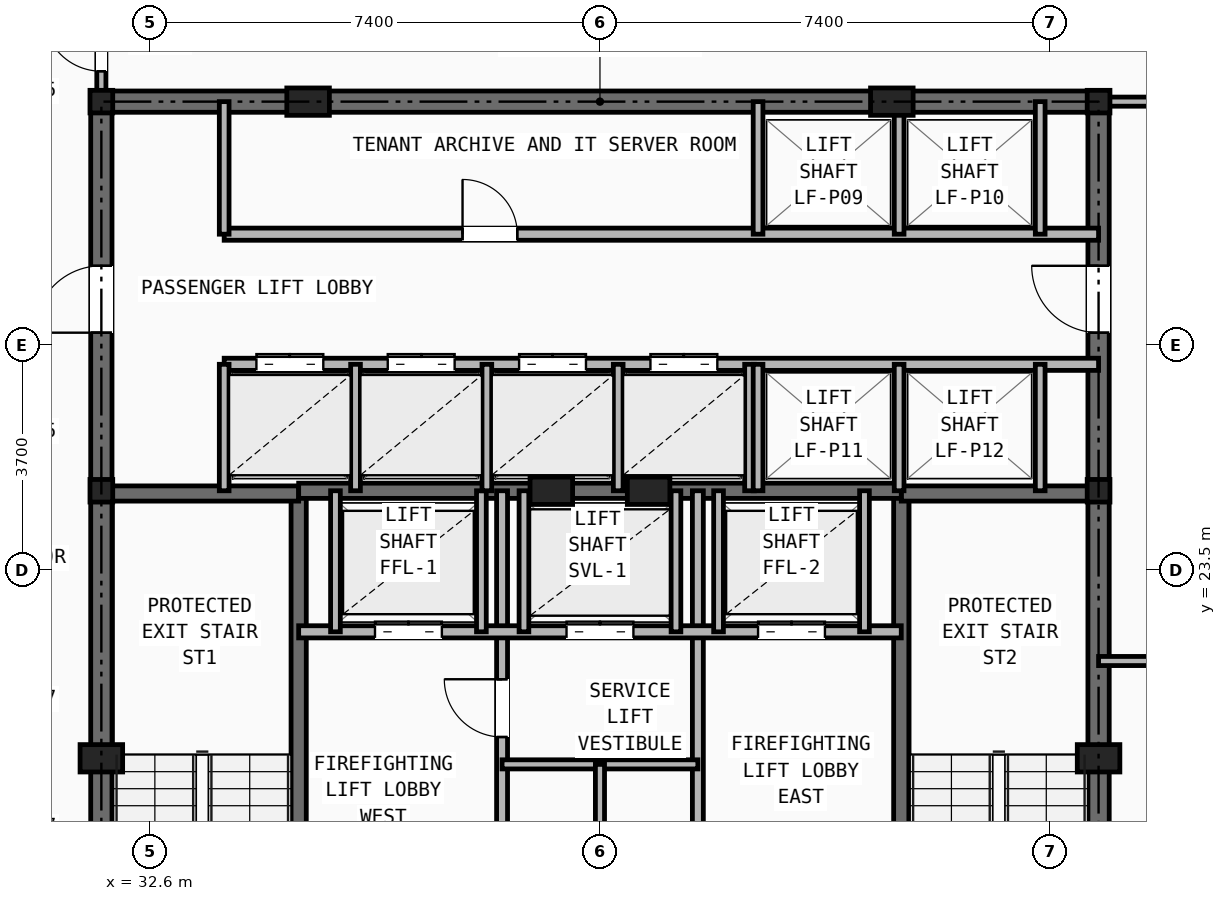
"""IFC4 building model, lengths in metres.
Left out: names, types, materials, properties, quantities, classifications, styles, units other than length and angle.
Written with IfcOpenShell. Run it as: python <this file> out.ifc"""

import sys

from ifc_helpers import new_model, si_unit, direction, frame, frame_2d, origin, origin_2d, place, context, subcontext, project, spatial, rectangle, i_section, extrude, element, fill, save


model = new_model("IFC4")
c1 = context("Model", 3, precision=1e-05, world=origin(), true_north=direction((0.0, 1.0)))
c2 = subcontext(c1, "Body", "Model", "MODEL_VIEW")
j1 = project(units=[si_unit("LENGTHUNIT", "METRE"), si_unit("PLANEANGLEUNIT", "RADIAN")], contexts=[c1])
p1 = place(None, origin())
s1 = spatial("IfcSite", under=j1, at=p1, CompositionType="ELEMENT")
p2 = place(p1, origin())
s2 = spatial("IfcBuilding", under=s1, at=p2, CompositionType="ELEMENT")
p3 = place(p2, frame((0.0, 0.0, 122.9)))
s3 = spatial("IfcBuildingStorey", under=s2, at=p3, CompositionType="ELEMENT", Elevation=122.9)
for number, where, z_axis, x_axis in (
    (1, (31.8, 24.8, 0.0), (0.0, 0.0, 1.0), (1.0, 0.0, 0.0)),
    (2, (48.2, 24.8, 0.0), (0.0, 0.0, 1.0), (1.0, 0.0, 0.0)),
    (3, (31.8, 31.2, 0.0), (0.0, 0.0, 1.0), (1.0, 0.0, 0.0)),
    (4, (48.2, 31.2, 0.0), (0.0, 0.0, 1.0), (1.0, 0.0, 0.0)),
):
    element("IfcColumn", number, at=place(p3, frame(where, z_axis=z_axis, x_axis=x_axis)), inside=s3, PredefinedType="COLUMN", context=c2, shape_type="SweptSolid", body=[
        extrude(i_section(OverallWidth=0.374, OverallDepth=0.372, WebThickness=0.016, FlangeThickness=0.026, at=origin_2d()), origin(), (0.0, 0.0, 1.0), 3.45),
    ])
for number, where, z_axis, x_axis in (
    (5, (31.8, 20.4, 0.0), (0.0, 0.0, 1.0), (1.0, 0.0, 0.0)),
    (6, (48.2, 20.4, 0.0), (0.0, 0.0, 1.0), (1.0, 0.0, 0.0)),
    (7, (35.2, 31.2, 0.0), (0.0, 0.0, 1.0), (1.0, 0.0, 0.0)),
    (8, (44.8, 31.2, 0.0), (0.0, 0.0, 1.0), (1.0, 0.0, 0.0)),
    (9, (39.2, 24.8, 0.0), (0.0, 0.0, 1.0), (1.0, 0.0, 0.0)),
    (10, (40.8, 24.8, 0.0), (0.0, 0.0, 1.0), (1.0, 0.0, 0.0)),
):
    element("IfcColumn", number, at=place(p3, frame(where, z_axis=z_axis, x_axis=x_axis)), inside=s3, PredefinedType="PILASTER", context=c2, shape_type="SweptSolid", body=[
        extrude(rectangle(XDim=0.7, YDim=0.45, at=origin_2d()), origin(), (0.0, 0.0, 1.0), 3.45),
    ])
p4 = place(p3, frame((31.8, 31.2, 0.0), z_axis=(0.0, 0.0, 1.0), x_axis=(1.0, 0.0, 0.0)))
e11 = element("IfcWall", 11, at=p4, inside=s3, PredefinedType="SHEAR", context=c2, shape_type="SweptSolid", body=[
    extrude(rectangle(XDim=16.4, YDim=0.35, at=frame_2d((8.2, 0.0))), origin(), (0.0, 0.0, 1.0), 3.21),
])
p5 = place(p3, frame((31.8, 16.4, 0.0), z_axis=(0.0, 0.0, 1.0), x_axis=(0.0, 1.0, 0.0)))
e12 = element("IfcWall", 12, at=p5, inside=s3, PredefinedType="SHEAR", context=c2, shape_type="SweptSolid", body=[
    extrude(rectangle(XDim=14.8, YDim=0.35, at=frame_2d((7.4, 0.0))), origin(), (0.0, 0.0, 1.0), 3.21),
])
p6 = place(p5, frame((11.0, 0.0, 0.0)))
e13 = element("IfcOpeningElement", 13, at=p6, cuts=e12, PredefinedType="OPENING", context=c2, shape_type="SweptSolid", body=[
    extrude(rectangle(XDim=1.1, YDim=2.15, at=frame_2d((0.55, 1.075))), frame((0.0, 0.185, 0.0), z_axis=(0.0, -1.0, 0.0), x_axis=(1.0, 0.0, 0.0)), (0.0, 0.0, 1.0), 0.37),
])
p7 = place(p3, frame((48.2, 16.4, 0.0), z_axis=(0.0, 0.0, 1.0), x_axis=(0.0, 1.0, 0.0)))
e14 = element("IfcWall", 14, at=p7, inside=s3, PredefinedType="SHEAR", context=c2, shape_type="SweptSolid", body=[
    extrude(rectangle(XDim=14.8, YDim=0.35, at=frame_2d((7.4, 0.0))), origin(), (0.0, 0.0, 1.0), 3.21),
])
p8 = place(p7, frame((11.0, 0.0, 0.0)))
e15 = element("IfcOpeningElement", 15, at=p8, cuts=e14, PredefinedType="OPENING", context=c2, shape_type="SweptSolid", body=[
    extrude(rectangle(XDim=1.1, YDim=2.15, at=frame_2d((0.55, 1.075))), frame((0.0, 0.185, 0.0), z_axis=(0.0, -1.0, 0.0), x_axis=(1.0, 0.0, 0.0)), (0.0, 0.0, 1.0), 0.37),
])
p9 = place(p3, frame((35.045, 16.4, 0.0), z_axis=(0.0, 0.0, 1.0), x_axis=(0.0, 1.0, 0.0)))
e16 = element("IfcWall", 16, at=p9, inside=s3, PredefinedType="SHEAR", context=c2, shape_type="SweptSolid", body=[
    extrude(rectangle(XDim=8.4, YDim=0.25, at=frame_2d((4.2, 0.0))), origin(), (0.0, 0.0, 1.0), 3.21),
])
p10 = place(p9, frame((0.45, 0.0, 0.0)))
e17 = element("IfcOpeningElement", 17, at=p10, cuts=e16, PredefinedType="OPENING", context=c2, shape_type="SweptSolid", body=[
    extrude(rectangle(XDim=0.95, YDim=2.1, at=frame_2d((0.475, 1.05))), frame((0.0, 0.135, 0.0), z_axis=(0.0, -1.0, 0.0), x_axis=(1.0, 0.0, 0.0)), (0.0, 0.0, 1.0), 0.27),
])
p11 = place(p3, frame((31.8, 24.755, 0.0), z_axis=(0.0, 0.0, 1.0), x_axis=(1.0, 0.0, 0.0)))
e18 = element("IfcWall", 18, at=p11, inside=s3, PredefinedType="SHEAR", context=c2, shape_type="SweptSolid", body=[
    extrude(rectangle(XDim=3.245, YDim=0.25, at=frame_2d((1.623, 0.0))), origin(), (0.0, 0.0, 1.0), 3.21),
])
p12 = place(p3, frame((44.955, 16.4, 0.0), z_axis=(0.0, 0.0, 1.0), x_axis=(0.0, 1.0, 0.0)))
e19 = element("IfcWall", 19, at=p12, inside=s3, PredefinedType="SHEAR", context=c2, shape_type="SweptSolid", body=[
    extrude(rectangle(XDim=8.4, YDim=0.25, at=frame_2d((4.2, 0.0))), origin(), (0.0, 0.0, 1.0), 3.21),
])
p13 = place(p12, frame((0.45, 0.0, 0.0)))
e20 = element("IfcOpeningElement", 20, at=p13, cuts=e19, PredefinedType="OPENING", context=c2, shape_type="SweptSolid", body=[
    extrude(rectangle(XDim=0.95, YDim=2.1, at=frame_2d((0.475, 1.05))), frame((0.0, 0.135, 0.0), z_axis=(0.0, -1.0, 0.0), x_axis=(1.0, 0.0, 0.0)), (0.0, 0.0, 1.0), 0.27),
])
p14 = place(p3, frame((44.955, 24.755, 0.0), z_axis=(0.0, 0.0, 1.0), x_axis=(1.0, 0.0, 0.0)))
e21 = element("IfcWall", 21, at=p14, inside=s3, PredefinedType="SHEAR", context=c2, shape_type="SweptSolid", body=[
    extrude(rectangle(XDim=3.245, YDim=0.25, at=frame_2d((1.623, 0.0))), origin(), (0.0, 0.0, 1.0), 3.21),
])
p15 = place(p3, frame((35.045, 24.8, 0.0), z_axis=(0.0, 0.0, 1.0), x_axis=(1.0, 0.0, 0.0)))
e22 = element("IfcWall", 22, at=p15, inside=s3, PredefinedType="SHEAR", context=c2, shape_type="SweptSolid", body=[
    extrude(rectangle(XDim=9.91, YDim=0.25, at=frame_2d((4.955, 0.0))), origin(), (0.0, 0.0, 1.0), 3.21),
])
p16 = place(p3, frame((38.39, 16.4, 0.0), z_axis=(0.0, 0.0, 1.0), x_axis=(0.0, 1.0, 0.0)))
e23 = element("IfcWall", 23, at=p16, inside=s3, PredefinedType="PARTITIONING", context=c2, shape_type="SweptSolid", body=[
    extrude(rectangle(XDim=8.4, YDim=0.18, at=frame_2d((4.2, 0.0))), origin(), (0.0, 0.0, 1.0), 2.938),
])
p17 = place(p16, frame((1.8, 0.0, 0.0)))
e24 = element("IfcOpeningElement", 24, at=p17, cuts=e23, PredefinedType="OPENING", context=c2, shape_type="SweptSolid", body=[
    extrude(rectangle(XDim=0.85, YDim=2.05, at=frame_2d((0.425, 1.025))), frame((0.0, 0.1, 0.0), z_axis=(0.0, -1.0, 0.0), x_axis=(1.0, 0.0, 0.0)), (0.0, 0.0, 1.0), 0.2),
])
p18 = place(p16, frame((4.35, 0.0, 0.0)))
e25 = element("IfcOpeningElement", 25, at=p18, cuts=e23, PredefinedType="OPENING", context=c2, shape_type="SweptSolid", body=[
    extrude(rectangle(XDim=0.95, YDim=2.1, at=frame_2d((0.475, 1.05))), frame((0.0, 0.1, 0.0), z_axis=(0.0, -1.0, 0.0), x_axis=(1.0, 0.0, 0.0)), (0.0, 0.0, 1.0), 0.2),
])
p19 = place(p3, frame((41.61, 16.4, 0.0), z_axis=(0.0, 0.0, 1.0), x_axis=(0.0, 1.0, 0.0)))
e26 = element("IfcWall", 26, at=p19, inside=s3, PredefinedType="PARTITIONING", context=c2, shape_type="SweptSolid", body=[
    extrude(rectangle(XDim=8.4, YDim=0.18, at=frame_2d((4.2, 0.0))), origin(), (0.0, 0.0, 1.0), 2.938),
])
p20 = place(p19, frame((1.8, 0.0, 0.0)))
e27 = element("IfcOpeningElement", 27, at=p20, cuts=e26, PredefinedType="OPENING", context=c2, shape_type="SweptSolid", body=[
    extrude(rectangle(XDim=0.85, YDim=2.05, at=frame_2d((0.425, 1.025))), frame((0.0, 0.1, 0.0), z_axis=(0.0, -1.0, 0.0), x_axis=(1.0, 0.0, 0.0)), (0.0, 0.0, 1.0), 0.2),
])
p21 = place(p3, frame((35.045, 22.48, 0.0), z_axis=(0.0, 0.0, 1.0), x_axis=(1.0, 0.0, 0.0)))
e28 = element("IfcWall", 28, at=p21, inside=s3, PredefinedType="SOLIDWALL", context=c2, shape_type="SweptSolid", body=[
    extrude(rectangle(XDim=9.91, YDim=0.2, at=frame_2d((4.955, 0.0))), origin(), (0.0, 0.0, 1.0), 3.21),
])
p22 = place(p21, frame((1.255, 0.0, 0.0)))
e29 = element("IfcOpeningElement", 29, at=p22, cuts=e28, PredefinedType="OPENING", context=c2, shape_type="SweptSolid", body=[
    extrude(rectangle(XDim=1.1, YDim=2.15, at=frame_2d((0.55, 1.075))), frame((0.0, 0.11, 0.0), z_axis=(0.0, -1.0, 0.0), x_axis=(1.0, 0.0, 0.0)), (0.0, 0.0, 1.0), 0.22),
])
p23 = place(p21, frame((7.555, 0.0, 0.0)))
e30 = element("IfcOpeningElement", 30, at=p23, cuts=e28, PredefinedType="OPENING", context=c2, shape_type="SweptSolid", body=[
    extrude(rectangle(XDim=1.1, YDim=2.15, at=frame_2d((0.55, 1.075))), frame((0.0, 0.11, 0.0), z_axis=(0.0, -1.0, 0.0), x_axis=(1.0, 0.0, 0.0)), (0.0, 0.0, 1.0), 0.22),
])
p24 = place(p21, frame((4.405, 0.0, 0.0)))
e31 = element("IfcOpeningElement", 31, at=p24, cuts=e28, PredefinedType="OPENING", context=c2, shape_type="SweptSolid", body=[
    extrude(rectangle(XDim=1.1, YDim=2.15, at=frame_2d((0.55, 1.075))), frame((0.0, 0.11, 0.0), z_axis=(0.0, -1.0, 0.0), x_axis=(1.0, 0.0, 0.0)), (0.0, 0.0, 1.0), 0.22),
])
p25 = place(p3, frame((38.39, 20.3, 0.0), z_axis=(0.0, 0.0, 1.0), x_axis=(1.0, 0.0, 0.0)))
e32 = element("IfcWall", 32, at=p25, inside=s3, PredefinedType="PARTITIONING", context=c2, shape_type="SweptSolid", body=[
    extrude(rectangle(XDim=3.22, YDim=0.15, at=frame_2d((1.61, 0.0))), origin(), (0.0, 0.0, 1.0), 3.21),
])
p26 = place(p3, frame((40.0, 16.4, 0.0), z_axis=(0.0, 0.0, 1.0), x_axis=(0.0, 1.0, 0.0)))
e33 = element("IfcWall", 33, at=p26, inside=s3, PredefinedType="PARTITIONING", context=c2, shape_type="SweptSolid", body=[
    extrude(rectangle(XDim=3.9, YDim=0.15, at=frame_2d((1.95, 0.0))), origin(), (0.0, 0.0, 1.0), 2.938),
])
for number, where, z_axis, x_axis in (
    (34, (35.65, 22.48, 0.0), (0.0, 0.0, 1.0), (0.0, 1.0, 0.0)),
    (35, (38.05, 22.48, 0.0), (0.0, 0.0, 1.0), (0.0, 1.0, 0.0)),
    (36, (41.95, 22.48, 0.0), (0.0, 0.0, 1.0), (0.0, 1.0, 0.0)),
    (37, (44.35, 22.48, 0.0), (0.0, 0.0, 1.0), (0.0, 1.0, 0.0)),
    (38, (38.75, 22.48, 0.0), (0.0, 0.0, 1.0), (0.0, 1.0, 0.0)),
    (39, (41.25, 22.48, 0.0), (0.0, 0.0, 1.0), (0.0, 1.0, 0.0)),
):
    element("IfcWall", number, at=place(p3, frame(where, z_axis=z_axis, x_axis=x_axis)), inside=s3, PredefinedType="SOLIDWALL", context=c2, shape_type="SweptSolid", body=[
        extrude(rectangle(XDim=2.32, YDim=0.16, at=frame_2d((1.16, 0.0))), origin(), (0.0, 0.0, 1.0), 3.21),
    ])
p27 = place(p3, frame((33.82, 29.02, 0.0), z_axis=(0.0, 0.0, 1.0), x_axis=(1.0, 0.0, 0.0)))
e40 = element("IfcWall", 40, at=p27, inside=s3, PredefinedType="SOLIDWALL", context=c2, shape_type="SweptSolid", body=[
    extrude(rectangle(XDim=14.38, YDim=0.2, at=frame_2d((7.19, 0.0))), origin(), (0.0, 0.0, 1.0), 2.661),
])
p28 = place(p27, frame((3.92, 0.0, 0.0)))
e41 = element("IfcOpeningElement", 41, at=p28, cuts=e40, PredefinedType="OPENING", context=c2, shape_type="SweptSolid", body=[
    extrude(rectangle(XDim=0.9, YDim=2.1, at=frame_2d((0.45, 1.05))), frame((0.0, 0.11, 0.0), z_axis=(0.0, -1.0, 0.0), x_axis=(1.0, 0.0, 0.0)), (0.0, 0.0, 1.0), 0.22),
])
p29 = place(p3, frame((33.82, 26.88, 0.0), z_axis=(0.0, 0.0, 1.0), x_axis=(1.0, 0.0, 0.0)))
e42 = element("IfcWall", 42, at=p29, inside=s3, PredefinedType="SOLIDWALL", context=c2, shape_type="SweptSolid", body=[
    extrude(rectangle(XDim=14.38, YDim=0.2, at=frame_2d((7.19, 0.0))), origin(), (0.0, 0.0, 1.0), 2.661),
])
p30 = place(p29, frame((0.53, 0.0, 0.0)))
e43 = element("IfcOpeningElement", 43, at=p30, cuts=e42, PredefinedType="OPENING", context=c2, shape_type="SweptSolid", body=[
    extrude(rectangle(XDim=1.1, YDim=2.15, at=frame_2d((0.55, 1.075))), frame((0.0, 0.11, 0.0), z_axis=(0.0, -1.0, 0.0), x_axis=(1.0, 0.0, 0.0)), (0.0, 0.0, 1.0), 0.22),
])
p31 = place(p29, frame((2.69, 0.0, 0.0)))
e44 = element("IfcOpeningElement", 44, at=p31, cuts=e42, PredefinedType="OPENING", context=c2, shape_type="SweptSolid", body=[
    extrude(rectangle(XDim=1.1, YDim=2.15, at=frame_2d((0.55, 1.075))), frame((0.0, 0.11, 0.0), z_axis=(0.0, -1.0, 0.0), x_axis=(1.0, 0.0, 0.0)), (0.0, 0.0, 1.0), 0.22),
])
p32 = place(p29, frame((4.85, 0.0, 0.0)))
e45 = element("IfcOpeningElement", 45, at=p32, cuts=e42, PredefinedType="OPENING", context=c2, shape_type="SweptSolid", body=[
    extrude(rectangle(XDim=1.1, YDim=2.15, at=frame_2d((0.55, 1.075))), frame((0.0, 0.11, 0.0), z_axis=(0.0, -1.0, 0.0), x_axis=(1.0, 0.0, 0.0)), (0.0, 0.0, 1.0), 0.22),
])
p33 = place(p29, frame((7.01, 0.0, 0.0)))
e46 = element("IfcOpeningElement", 46, at=p33, cuts=e42, PredefinedType="OPENING", context=c2, shape_type="SweptSolid", body=[
    extrude(rectangle(XDim=1.1, YDim=2.15, at=frame_2d((0.55, 1.075))), frame((0.0, 0.11, 0.0), z_axis=(0.0, -1.0, 0.0), x_axis=(1.0, 0.0, 0.0)), (0.0, 0.0, 1.0), 0.22),
])
p34 = place(p3, frame((33.82, 29.02, 0.0), z_axis=(0.0, 0.0, 1.0), x_axis=(0.0, 1.0, 0.0)))
e47 = element("IfcWall", 47, at=p34, inside=s3, PredefinedType="SOLIDWALL", context=c2, shape_type="SweptSolid", body=[
    extrude(rectangle(XDim=2.18, YDim=0.16, at=frame_2d((1.09, 0.0))), origin(), (0.0, 0.0, 1.0), 2.938),
])
for number, where, z_axis, x_axis in (
    (48, (33.82, 24.8, 0.0), (0.0, 0.0, 1.0), (0.0, 1.0, 0.0)),
    (49, (35.98, 24.8, 0.0), (0.0, 0.0, 1.0), (0.0, 1.0, 0.0)),
    (50, (38.14, 24.8, 0.0), (0.0, 0.0, 1.0), (0.0, 1.0, 0.0)),
    (51, (40.3, 24.8, 0.0), (0.0, 0.0, 1.0), (0.0, 1.0, 0.0)),
    (52, (42.46, 24.8, 0.0), (0.0, 0.0, 1.0), (0.0, 1.0, 0.0)),
):
    element("IfcWall", number, at=place(p3, frame(where, z_axis=z_axis, x_axis=x_axis)), inside=s3, PredefinedType="SOLIDWALL", context=c2, shape_type="SweptSolid", body=[
        extrude(rectangle(XDim=2.08, YDim=0.16, at=frame_2d((1.04, 0.0))), origin(), (0.0, 0.0, 1.0), 3.21),
    ])
for number, where, z_axis, x_axis in (
    (53, (42.6, 29.02, 0.0), (0.0, 0.0, 1.0), (0.0, 1.0, 0.0)),
    (54, (44.92, 29.02, 0.0), (0.0, 0.0, 1.0), (0.0, 1.0, 0.0)),
    (55, (47.24, 29.02, 0.0), (0.0, 0.0, 1.0), (0.0, 1.0, 0.0)),
):
    element("IfcWall", number, at=place(p3, frame(where, z_axis=z_axis, x_axis=x_axis)), inside=s3, PredefinedType="SOLIDWALL", context=c2, shape_type="SweptSolid", body=[
        extrude(rectangle(XDim=2.18, YDim=0.16, at=frame_2d((1.09, 0.0))), origin(), (0.0, 0.0, 1.0), 2.938),
    ])
for number, where, z_axis, x_axis in (
    (56, (42.6, 24.8, 0.0), (0.0, 0.0, 1.0), (0.0, 1.0, 0.0)),
    (57, (44.92, 24.8, 0.0), (0.0, 0.0, 1.0), (0.0, 1.0, 0.0)),
    (58, (47.24, 24.8, 0.0), (0.0, 0.0, 1.0), (0.0, 1.0, 0.0)),
):
    element("IfcWall", number, at=place(p3, frame(where, z_axis=z_axis, x_axis=x_axis)), inside=s3, PredefinedType="SOLIDWALL", context=c2, shape_type="SweptSolid", body=[
        extrude(rectangle(XDim=2.08, YDim=0.16, at=frame_2d((1.04, 0.0))), origin(), (0.0, 0.0, 1.0), 3.21),
    ])
p35 = place(p3, frame((31.8, 31.2, 0.0), z_axis=(0.0, 0.0, 1.0), x_axis=(0.0, 1.0, 0.0)))
e59 = element("IfcWall", 59, at=p35, inside=s3, PredefinedType="PARTITIONING", context=c2, shape_type="SweptSolid", body=[
    extrude(rectangle(XDim=5.3, YDim=0.15, at=frame_2d((2.65, 0.0))), origin(), (0.0, 0.0, 1.0), 2.252),
])
p36 = place(p35, frame((0.5, 0.0, 0.0)))
e60 = element("IfcOpeningElement", 60, at=p36, cuts=e59, PredefinedType="OPENING", context=c2, shape_type="SweptSolid", body=[
    extrude(rectangle(XDim=0.95, YDim=2.1, at=frame_2d((0.475, 1.05))), frame((0.0, 0.085, 0.0), z_axis=(0.0, -1.0, 0.0), x_axis=(1.0, 0.0, 0.0)), (0.0, 0.0, 1.0), 0.17),
])
p37 = place(p35, frame((4.23, 0.0, 0.0)))
e61 = element("IfcOpeningElement", 61, at=p37, cuts=e59, PredefinedType="OPENING", context=c2, shape_type="SweptSolid", body=[
    extrude(rectangle(XDim=0.95, YDim=2.1, at=frame_2d((0.475, 1.05))), frame((0.0, 0.085, 0.0), z_axis=(0.0, -1.0, 0.0), x_axis=(1.0, 0.0, 0.0)), (0.0, 0.0, 1.0), 0.17),
])
p38 = place(p3, frame((48.2, 31.2, 0.0), z_axis=(0.0, 0.0, 1.0), x_axis=(1.0, 0.0, 0.0)))
e62 = element("IfcWall", 62, at=p38, inside=s3, PredefinedType="PARTITIONING", context=c2, shape_type="SweptSolid", body=[
    extrude(rectangle(XDim=8.972, YDim=0.15, at=frame_2d((4.486, 0.0))), origin(), (0.0, 0.0, 1.0), 2.252),
])
p39 = place(p3, frame((48.2, 22.0, 0.0), z_axis=(0.0, 0.0, 1.0), x_axis=(1.0, 0.0, 0.0)))
e63 = element("IfcWall", 63, at=p39, inside=s3, PredefinedType="PARTITIONING", context=c2, shape_type="SweptSolid", body=[
    extrude(rectangle(XDim=14.262, YDim=0.15, at=frame_2d((7.131, 0.0))), origin(), (0.0, 0.0, 1.0), 2.589),
])
p40 = place(p39, frame((1.4, 0.0, 0.0)))
e64 = element("IfcOpeningElement", 64, at=p40, cuts=e63, PredefinedType="OPENING", context=c2, shape_type="SweptSolid", body=[
    extrude(rectangle(XDim=0.95, YDim=2.1, at=frame_2d((0.475, 1.05))), frame((0.0, 0.085, 0.0), z_axis=(0.0, -1.0, 0.0), x_axis=(1.0, 0.0, 0.0)), (0.0, 0.0, 1.0), 0.17),
])
p41 = place(p18, origin())
e65 = element("IfcDoor", 65, at=p41, inside=s3, OperationType="SINGLE_SWING_RIGHT", PredefinedType="DOOR", context=c2, shape_type="SweptSolid", body=[
    extrude(rectangle(XDim=0.95, YDim=2.1, at=frame_2d((0.475, 1.05))), frame((0.0, 0.025, 0.0), z_axis=(0.0, -1.0, 0.0), x_axis=(1.0, 0.0, 0.0)), (0.0, 0.0, 1.0), 0.05),
])
fill(e25, e65)
p42 = place(p22, origin())
e66 = element("IfcDoor", 66, at=p42, inside=s3, OperationType="DOUBLE_DOOR_SLIDING", PredefinedType="DOOR", context=c2, shape_type="SweptSolid", body=[
    extrude(rectangle(XDim=1.1, YDim=2.15, at=frame_2d((0.55, 1.075))), frame((0.0, 0.025, 0.0), z_axis=(0.0, -1.0, 0.0), x_axis=(1.0, 0.0, 0.0)), (0.0, 0.0, 1.0), 0.05),
])
fill(e29, e66)
p43 = place(p23, origin())
e67 = element("IfcDoor", 67, at=p43, inside=s3, OperationType="DOUBLE_DOOR_SLIDING", PredefinedType="DOOR", context=c2, shape_type="SweptSolid", body=[
    extrude(rectangle(XDim=1.1, YDim=2.15, at=frame_2d((0.55, 1.075))), frame((0.0, 0.025, 0.0), z_axis=(0.0, -1.0, 0.0), x_axis=(1.0, 0.0, 0.0)), (0.0, 0.0, 1.0), 0.05),
])
fill(e30, e67)
p44 = place(p24, origin())
e68 = element("IfcDoor", 68, at=p44, inside=s3, OperationType="DOUBLE_DOOR_SLIDING", PredefinedType="DOOR", context=c2, shape_type="SweptSolid", body=[
    extrude(rectangle(XDim=1.1, YDim=2.15, at=frame_2d((0.55, 1.075))), frame((0.0, 0.025, 0.0), z_axis=(0.0, -1.0, 0.0), x_axis=(1.0, 0.0, 0.0)), (0.0, 0.0, 1.0), 0.05),
])
fill(e31, e68)
p45 = place(p6, origin())
e69 = element("IfcDoor", 69, at=p45, inside=s3, OperationType="SINGLE_SWING_LEFT", PredefinedType="DOOR", context=c2, shape_type="SweptSolid", body=[
    extrude(rectangle(XDim=1.1, YDim=2.15, at=frame_2d((0.55, 1.075))), frame((0.0, 0.025, 0.0), z_axis=(0.0, -1.0, 0.0), x_axis=(1.0, 0.0, 0.0)), (0.0, 0.0, 1.0), 0.05),
])
fill(e13, e69)
p46 = place(p8, origin())
e70 = element("IfcDoor", 70, at=p46, inside=s3, OperationType="SINGLE_SWING_RIGHT", PredefinedType="DOOR", context=c2, shape_type="SweptSolid", body=[
    extrude(rectangle(XDim=1.1, YDim=2.15, at=frame_2d((0.55, 1.075))), frame((0.0, 0.025, 0.0), z_axis=(0.0, -1.0, 0.0), x_axis=(1.0, 0.0, 0.0)), (0.0, 0.0, 1.0), 0.05),
])
fill(e15, e70)
p47 = place(p28, origin())
e71 = element("IfcDoor", 71, at=p47, inside=s3, OperationType="SINGLE_SWING_LEFT", PredefinedType="DOOR", context=c2, shape_type="SweptSolid", body=[
    extrude(rectangle(XDim=0.9, YDim=2.1, at=frame_2d((0.45, 1.05))), frame((0.0, 0.025, 0.0), z_axis=(0.0, -1.0, 0.0), x_axis=(1.0, 0.0, 0.0)), (0.0, 0.0, 1.0), 0.05),
])
fill(e41, e71)
p48 = place(p30, origin())
e72 = element("IfcDoor", 72, at=p48, inside=s3, OperationType="DOUBLE_DOOR_SLIDING", PredefinedType="DOOR", context=c2, shape_type="SweptSolid", body=[
    extrude(rectangle(XDim=1.1, YDim=2.15, at=frame_2d((0.55, 1.075))), frame((0.0, 0.025, 0.0), z_axis=(0.0, -1.0, 0.0), x_axis=(1.0, 0.0, 0.0)), (0.0, 0.0, 1.0), 0.05),
])
fill(e43, e72)
p49 = place(p31, origin())
e73 = element("IfcDoor", 73, at=p49, inside=s3, OperationType="DOUBLE_DOOR_SLIDING", PredefinedType="DOOR", context=c2, shape_type="SweptSolid", body=[
    extrude(rectangle(XDim=1.1, YDim=2.15, at=frame_2d((0.55, 1.075))), frame((0.0, 0.025, 0.0), z_axis=(0.0, -1.0, 0.0), x_axis=(1.0, 0.0, 0.0)), (0.0, 0.0, 1.0), 0.05),
])
fill(e44, e73)
p50 = place(p32, origin())
e74 = element("IfcDoor", 74, at=p50, inside=s3, OperationType="DOUBLE_DOOR_SLIDING", PredefinedType="DOOR", context=c2, shape_type="SweptSolid", body=[
    extrude(rectangle(XDim=1.1, YDim=2.15, at=frame_2d((0.55, 1.075))), frame((0.0, 0.025, 0.0), z_axis=(0.0, -1.0, 0.0), x_axis=(1.0, 0.0, 0.0)), (0.0, 0.0, 1.0), 0.05),
])
fill(e45, e74)
p51 = place(p33, origin())
e75 = element("IfcDoor", 75, at=p51, inside=s3, OperationType="DOUBLE_DOOR_SLIDING", PredefinedType="DOOR", context=c2, shape_type="SweptSolid", body=[
    extrude(rectangle(XDim=1.1, YDim=2.15, at=frame_2d((0.55, 1.075))), frame((0.0, 0.025, 0.0), z_axis=(0.0, -1.0, 0.0), x_axis=(1.0, 0.0, 0.0)), (0.0, 0.0, 1.0), 0.05),
])
fill(e46, e75)
p52 = place(p36, origin())
e76 = element("IfcDoor", 76, at=p52, inside=s3, OperationType="SINGLE_SWING_RIGHT", PredefinedType="DOOR", context=c2, shape_type="SweptSolid", body=[
    extrude(rectangle(XDim=0.95, YDim=2.1, at=frame_2d((0.475, 1.05))), frame((0.0, 0.025, 0.0), z_axis=(0.0, -1.0, 0.0), x_axis=(1.0, 0.0, 0.0)), (0.0, 0.0, 1.0), 0.05),
])
fill(e60, e76)
save(model, sys.argv[1])
